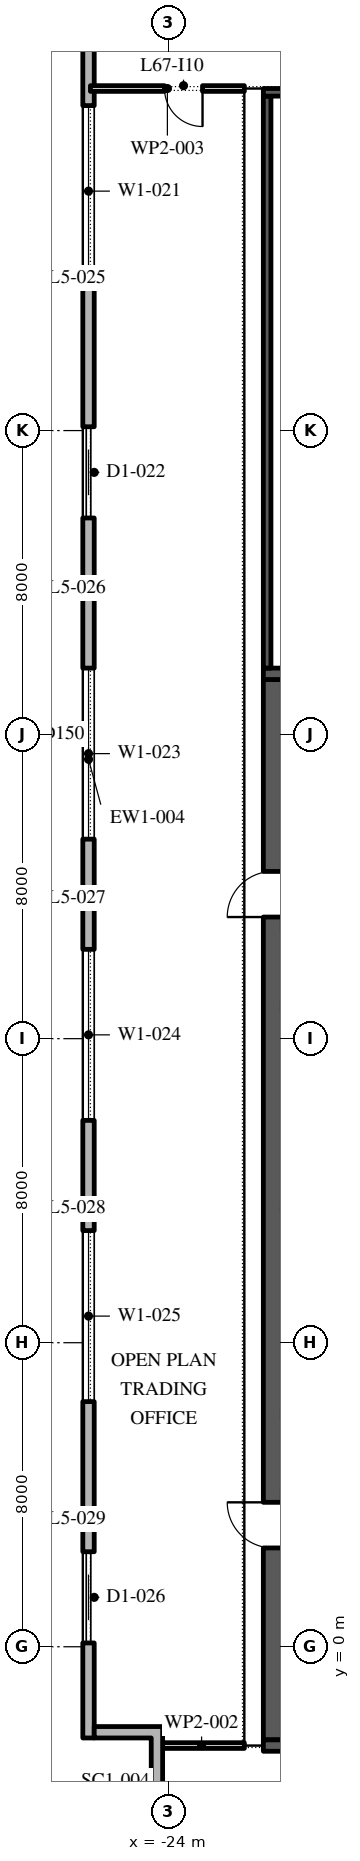
"""IFC4 building model, lengths in metres.
Left out: names, types, materials, properties, quantities, classifications, styles, units other than length and angle.
Written with IfcOpenShell. Run it as: python <this file> out.ifc"""

import sys

from ifc_helpers import new_model, si_unit, direction, frame, frame_2d, origin, place, context, subcontext, project, spatial, polyline, rectangle, outline, extrude, element, fill, save


model = new_model("IFC4")
c1 = context("Model", 3, precision=1e-05, world=origin(), true_north=direction((0.0, 1.0)))
c2 = subcontext(c1, "Body", "Model", "MODEL_VIEW")
j1 = project(units=[si_unit("LENGTHUNIT", "METRE"), si_unit("PLANEANGLEUNIT", "RADIAN")], contexts=[c1])
p1 = place(None, origin())
s1 = spatial("IfcSite", under=j1, at=p1, CompositionType="ELEMENT")
p2 = place(p1, origin())
s2 = spatial("IfcBuilding", under=s1, at=p2, CompositionType="ELEMENT")
p3 = place(p2, frame((0.0, 0.0, 309.0)))
s3 = spatial("IfcBuildingStorey", under=s2, at=p3, CompositionType="ELEMENT", Elevation=309.0)
p4 = place(p3, frame((-26.1, 49.1, 0.0), z_axis=(0.0, 0.0, 1.0), x_axis=(0.0, -1.0, 0.0)))
e1 = element("IfcWall", 1, at=p4, inside=s3, PredefinedType="STANDARD", context=c2, shape_type="SweptSolid", body=[
    extrude(rectangle(XDim=51.5, YDim=0.3, at=frame_2d((25.75, 0.0))), origin(), (0.0, 0.0, 1.0), 4.0),
])
p5 = place(p4, frame((1.3, 0.0, 0.45)))
e2 = element("IfcOpeningElement", 2, at=p5, cuts=e1, PredefinedType="OPENING", context=c2, shape_type="SweptSolid", body=[
    extrude(rectangle(XDim=4.5, YDim=3.05, at=frame_2d((2.25, 1.525))), frame((0.0, 0.16, 0.0), z_axis=(0.0, -1.0, 0.0), x_axis=(1.0, 0.0, 0.0)), (0.0, 0.0, 1.0), 0.32),
])
p6 = place(p4, frame((8.55, 0.0, 0.45)))
e3 = element("IfcOpeningElement", 3, at=p6, cuts=e1, PredefinedType="OPENING", context=c2, shape_type="SweptSolid", body=[
    extrude(rectangle(XDim=4.5, YDim=3.05, at=frame_2d((2.25, 1.525))), frame((0.0, 0.16, 0.0), z_axis=(0.0, -1.0, 0.0), x_axis=(1.0, 0.0, 0.0)), (0.0, 0.0, 1.0), 0.32),
])
p7 = place(p4, frame((17.0, 0.0, 0.0)))
e4 = element("IfcOpeningElement", 4, at=p7, cuts=e1, PredefinedType="OPENING", context=c2, shape_type="SweptSolid", body=[
    extrude(rectangle(XDim=2.4, YDim=3.5, at=frame_2d((1.2, 1.75))), frame((0.0, 0.16, 0.0), z_axis=(0.0, -1.0, 0.0), x_axis=(1.0, 0.0, 0.0)), (0.0, 0.0, 1.0), 0.32),
])
p8 = place(p4, frame((23.35, 0.0, 0.45)))
e5 = element("IfcOpeningElement", 5, at=p8, cuts=e1, PredefinedType="OPENING", context=c2, shape_type="SweptSolid", body=[
    extrude(rectangle(XDim=4.5, YDim=3.05, at=frame_2d((2.25, 1.525))), frame((0.0, 0.16, 0.0), z_axis=(0.0, -1.0, 0.0), x_axis=(1.0, 0.0, 0.0)), (0.0, 0.0, 1.0), 0.32),
])
p9 = place(p4, frame((30.75, 0.0, 0.45)))
e6 = element("IfcOpeningElement", 6, at=p9, cuts=e1, PredefinedType="OPENING", context=c2, shape_type="SweptSolid", body=[
    extrude(rectangle(XDim=4.5, YDim=3.05, at=frame_2d((2.25, 1.525))), frame((0.0, 0.16, 0.0), z_axis=(0.0, -1.0, 0.0), x_axis=(1.0, 0.0, 0.0)), (0.0, 0.0, 1.0), 0.32),
])
p10 = place(p4, frame((38.15, 0.0, 0.45)))
e7 = element("IfcOpeningElement", 7, at=p10, cuts=e1, PredefinedType="OPENING", context=c2, shape_type="SweptSolid", body=[
    extrude(rectangle(XDim=4.5, YDim=3.05, at=frame_2d((2.25, 1.525))), frame((0.0, 0.16, 0.0), z_axis=(0.0, -1.0, 0.0), x_axis=(1.0, 0.0, 0.0)), (0.0, 0.0, 1.0), 0.32),
])
p11 = place(p4, frame((46.6, 0.0, 0.0)))
e8 = element("IfcOpeningElement", 8, at=p11, cuts=e1, PredefinedType="OPENING", context=c2, shape_type="SweptSolid", body=[
    extrude(rectangle(XDim=2.4, YDim=3.5, at=frame_2d((1.2, 1.75))), frame((0.0, 0.16, 0.0), z_axis=(0.0, -1.0, 0.0), x_axis=(1.0, 0.0, 0.0)), (0.0, 0.0, 1.0), 0.32),
])
p12 = place(p3, origin())
e9 = element("IfcWall", 9, at=p12, inside=s3, PredefinedType="STANDARD", context=c2, shape_type="SweptSolid", body=[
    extrude(outline(polyline([(-22.65, -4.2), (-24.45, -4.2), (-24.45, -2.4), (-25.95, -2.4), (-25.95, -2.1), (-24.15, -2.1), (-24.15, -3.9), (-22.35, -3.9), (-22.35, -6.0), (-22.65, -6.0), (-22.65, -4.2)])), origin(), (0.0, 0.0, 1.0), 4.0),
])
p13 = place(p3, frame((-21.25, -2.45, 0.0), z_axis=(0.0, 0.0, 1.0), x_axis=(0.0, 1.0, 0.0)))
e10 = element("IfcWall", 10, at=p13, inside=s3, PredefinedType="SHEAR", context=c2, shape_type="SweptSolid", body=[
    extrude(rectangle(XDim=27.9, YDim=0.5, at=frame_2d((13.95, 0.0))), origin(), (0.0, 0.0, 1.0), 4.0),
])
p14 = place(p13, frame((5.05, 0.0, 0.0)))
e11 = element("IfcOpeningElement", 11, at=p14, cuts=e10, PredefinedType="OPENING", context=c2, shape_type="SweptSolid", body=[
    extrude(rectangle(XDim=1.2, YDim=2.1, at=frame_2d((0.6, 1.05))), frame((0.0, 0.26, 0.0), z_axis=(0.0, -1.0, 0.0), x_axis=(1.0, 0.0, 0.0)), (0.0, 0.0, 1.0), 0.52),
])
p15 = place(p13, frame((21.65, 0.0, 0.0)))
e12 = element("IfcOpeningElement", 12, at=p15, cuts=e10, PredefinedType="OPENING", context=c2, shape_type="SweptSolid", body=[
    extrude(rectangle(XDim=1.2, YDim=2.1, at=frame_2d((0.6, 1.05))), frame((0.0, 0.26, 0.0), z_axis=(0.0, -1.0, 0.0), x_axis=(1.0, 0.0, 0.0)), (0.0, 0.0, 1.0), 0.52),
])
for number, where, z_axis, x_axis in (
    (13, (-21.5, -2.6, 0.0), (0.0, 0.0, 1.0), (1.0, 0.0, 0.0)),
    (14, (-21.5, 25.6, 0.0), (0.0, 0.0, 1.0), (1.0, 0.0, 0.0)),
):
    element("IfcWall", number, at=place(p3, frame(where, z_axis=z_axis, x_axis=x_axis)), inside=s3, PredefinedType="SHEAR", context=c2, shape_type="SweptSolid", body=[
        extrude(rectangle(XDim=11.0, YDim=0.3, at=frame_2d((5.5, 0.0))), origin(), (0.0, 0.0, 1.0), 4.0),
    ])
p16 = place(p3, frame((-21.4, 25.75, 0.0), z_axis=(0.0, 0.0, 1.0), x_axis=(0.0, 1.0, 0.0)))
e15 = element("IfcWall", 15, at=p16, inside=s3, PredefinedType="SHEAR", context=c2, shape_type="SweptSolid", body=[
    extrude(rectangle(XDim=15.05, YDim=0.2, at=frame_2d((7.525, 0.0))), origin(), (0.0, 0.0, 1.0), 4.0),
])
p17 = place(p3, frame((-21.5, 40.9, 0.0), z_axis=(0.0, 0.0, 1.0), x_axis=(1.0, 0.0, 0.0)))
e16 = element("IfcWall", 16, at=p17, inside=s3, PredefinedType="SHEAR", context=c2, shape_type="SweptSolid", body=[
    extrude(rectangle(XDim=11.0, YDim=0.2, at=frame_2d((5.5, 0.0))), origin(), (0.0, 0.0, 1.0), 4.0),
])
p18 = place(p3, frame((-24.25, -2.6, 0.0), z_axis=(0.0, 0.0, 1.0), x_axis=(1.0, 0.0, 0.0)))
e17 = element("IfcWall", 17, at=p18, inside=s3, PredefinedType="PARTITIONING", context=c2, shape_type="SweptSolid", body=[
    extrude(rectangle(XDim=2.25, YDim=0.15, at=frame_2d((1.125, 0.0))), origin(), (0.0, 0.0, 1.0), 4.0),
])
p19 = place(p3, frame((-22.0, 41.0, 0.0), z_axis=(0.0, 0.0, 1.0), x_axis=(-1.0, 0.0, 0.0)))
e18 = element("IfcWall", 18, at=p19, inside=s3, PredefinedType="PARTITIONING", context=c2, shape_type="SweptSolid", body=[
    extrude(rectangle(XDim=4.05, YDim=0.15, at=frame_2d((2.025, 0.0))), origin(), (0.0, 0.0, 1.0), 4.0),
])
p20 = place(p19, frame((1.1, 0.0, 0.0)))
e19 = element("IfcOpeningElement", 19, at=p20, cuts=e18, PredefinedType="OPENING", context=c2, shape_type="SweptSolid", body=[
    extrude(rectangle(XDim=1.0, YDim=2.1, at=frame_2d((0.5, 1.05))), frame((0.0, 0.085, 0.0), z_axis=(0.0, -1.0, 0.0), x_axis=(1.0, 0.0, 0.0)), (0.0, 0.0, 1.0), 0.17),
])
p21 = place(p6, origin())
e20 = element("IfcWindow", 20, at=p21, inside=s3, PartitioningType="DOUBLE_PANEL_VERTICAL", PredefinedType="WINDOW", context=c2, shape_type="SweptSolid", body=[
    extrude(rectangle(XDim=4.5, YDim=3.05, at=frame_2d((2.25, 1.525))), frame((0.0, 0.03, 0.0), z_axis=(0.0, -1.0, 0.0), x_axis=(1.0, 0.0, 0.0)), (0.0, 0.0, 1.0), 0.06),
])
fill(e3, e20)
p22 = place(p7, origin())
e21 = element("IfcDoor", 21, at=p22, inside=s3, OperationType="DOUBLE_DOOR_SLIDING", PredefinedType="DOOR", context=c2, shape_type="SweptSolid", body=[
    extrude(rectangle(XDim=2.4, YDim=3.5, at=frame_2d((1.2, 1.75))), frame((0.0, 0.025, 0.0), z_axis=(0.0, -1.0, 0.0), x_axis=(1.0, 0.0, 0.0)), (0.0, 0.0, 1.0), 0.05),
])
fill(e4, e21)
p23 = place(p8, origin())
e22 = element("IfcWindow", 22, at=p23, inside=s3, PartitioningType="DOUBLE_PANEL_VERTICAL", PredefinedType="WINDOW", context=c2, shape_type="SweptSolid", body=[
    extrude(rectangle(XDim=4.5, YDim=3.05, at=frame_2d((2.25, 1.525))), frame((0.0, 0.03, 0.0), z_axis=(0.0, -1.0, 0.0), x_axis=(1.0, 0.0, 0.0)), (0.0, 0.0, 1.0), 0.06),
])
fill(e5, e22)
p24 = place(p9, origin())
e23 = element("IfcWindow", 23, at=p24, inside=s3, PartitioningType="DOUBLE_PANEL_VERTICAL", PredefinedType="WINDOW", context=c2, shape_type="SweptSolid", body=[
    extrude(rectangle(XDim=4.5, YDim=3.05, at=frame_2d((2.25, 1.525))), frame((0.0, 0.03, 0.0), z_axis=(0.0, -1.0, 0.0), x_axis=(1.0, 0.0, 0.0)), (0.0, 0.0, 1.0), 0.06),
])
fill(e6, e23)
p25 = place(p10, origin())
e24 = element("IfcWindow", 24, at=p25, inside=s3, PartitioningType="DOUBLE_PANEL_VERTICAL", PredefinedType="WINDOW", context=c2, shape_type="SweptSolid", body=[
    extrude(rectangle(XDim=4.5, YDim=3.05, at=frame_2d((2.25, 1.525))), frame((0.0, 0.03, 0.0), z_axis=(0.0, -1.0, 0.0), x_axis=(1.0, 0.0, 0.0)), (0.0, 0.0, 1.0), 0.06),
])
fill(e7, e24)
p26 = place(p11, origin())
e25 = element("IfcDoor", 25, at=p26, inside=s3, OperationType="DOUBLE_DOOR_SLIDING", PredefinedType="DOOR", context=c2, shape_type="SweptSolid", body=[
    extrude(rectangle(XDim=2.4, YDim=3.5, at=frame_2d((1.2, 1.75))), frame((0.0, 0.025, 0.0), z_axis=(0.0, -1.0, 0.0), x_axis=(1.0, 0.0, 0.0)), (0.0, 0.0, 1.0), 0.05),
])
fill(e8, e25)
p27 = place(p14, origin())
e26 = element("IfcDoor", 26, at=p27, inside=s3, OperationType="SINGLE_SWING_LEFT", PredefinedType="DOOR", context=c2, shape_type="SweptSolid", body=[
    extrude(rectangle(XDim=1.2, YDim=2.1, at=frame_2d((0.6, 1.05))), frame((0.0, 0.025, 0.0), z_axis=(0.0, -1.0, 0.0), x_axis=(1.0, 0.0, 0.0)), (0.0, 0.0, 1.0), 0.05),
])
fill(e11, e26)
p28 = place(p15, origin())
e27 = element("IfcDoor", 27, at=p28, inside=s3, OperationType="SINGLE_SWING_RIGHT", PredefinedType="DOOR", context=c2, shape_type="SweptSolid", body=[
    extrude(rectangle(XDim=1.2, YDim=2.1, at=frame_2d((0.6, 1.05))), frame((0.0, 0.025, 0.0), z_axis=(0.0, -1.0, 0.0), x_axis=(1.0, 0.0, 0.0)), (0.0, 0.0, 1.0), 0.05),
])
fill(e12, e27)
p29 = place(p20, origin())
e28 = element("IfcDoor", 28, at=p29, inside=s3, OperationType="SINGLE_SWING_RIGHT", PredefinedType="DOOR", context=c2, shape_type="SweptSolid", body=[
    extrude(rectangle(XDim=1.0, YDim=2.1, at=frame_2d((0.5, 1.05))), frame((0.0, 0.025, 0.0), z_axis=(0.0, -1.0, 0.0), x_axis=(1.0, 0.0, 0.0)), (0.0, 0.0, 1.0), 0.05),
])
fill(e19, e28)
save(model, sys.argv[1])
